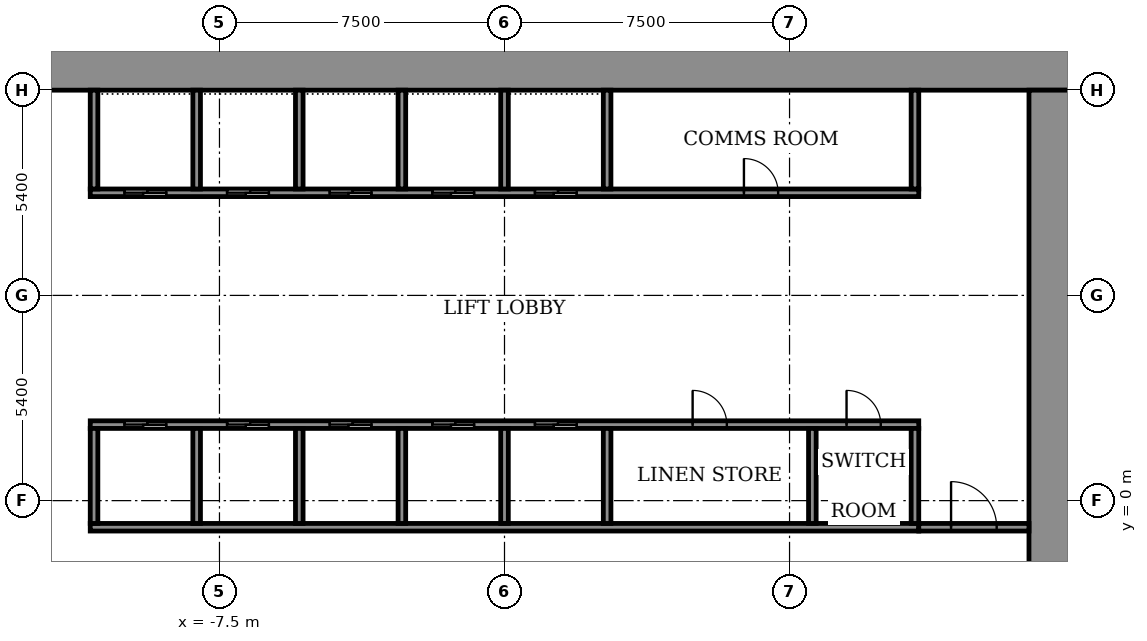
"""IFC4 building model, lengths in metres.
Left out: names, types, materials, properties, quantities, classifications, styles, units other than length and angle.
Written with IfcOpenShell. Run it as: python <this file> out.ifc"""

import sys

from ifc_helpers import new_model, si_unit, direction, frame, frame_2d, origin, place, context, subcontext, project, spatial, rectangle, extrude, element, fill, save


model = new_model("IFC4")
c1 = context("Model", 3, precision=1e-05, world=origin(), true_north=direction((0.0, 1.0)))
c2 = subcontext(c1, "Body", "Model", "MODEL_VIEW")
j1 = project(units=[si_unit("LENGTHUNIT", "METRE"), si_unit("PLANEANGLEUNIT", "RADIAN")], contexts=[c1])
p1 = place(None, origin())
s1 = spatial("IfcSite", under=j1, at=p1, CompositionType="ELEMENT")
p2 = place(p1, origin())
s2 = spatial("IfcBuilding", under=s1, at=p2, CompositionType="ELEMENT")
p3 = place(p2, frame((0.0, 0.0, 67.5)))
s3 = spatial("IfcBuildingStorey", under=s2, at=p3, CompositionType="ELEMENT", Elevation=67.5)
p4 = place(p3, frame((-14.9, 11.35, 0.0), z_axis=(0.0, 0.0, 1.0), x_axis=(1.0, 0.0, 0.0)))
e1 = element("IfcWall", 1, at=p4, inside=s3, PredefinedType="SHEAR", context=c2, shape_type="SweptSolid", body=[
    extrude(rectangle(XDim=29.8, YDim=1.1, at=frame_2d((14.9, 0.0))), origin(), (0.0, 0.0, 1.0), 3.6),
])
p5 = place(p3, frame((14.35, -10.8, 0.0), z_axis=(0.0, 0.0, 1.0), x_axis=(0.0, 1.0, 0.0)))
e2 = element("IfcWall", 2, at=p5, inside=s3, PredefinedType="SHEAR", context=c2, shape_type="SweptSolid", body=[
    extrude(rectangle(XDim=21.6, YDim=1.1, at=frame_2d((10.8, 0.0))), origin(), (0.0, 0.0, 1.0), 3.6),
])
p6 = place(p5, frame((1.2, 0.0, 0.0)))
e3 = element("IfcOpeningElement", 3, at=p6, cuts=e2, PredefinedType="OPENING", context=c2, shape_type="SweptSolid", body=[
    extrude(rectangle(XDim=1.2, YDim=2.1, at=frame_2d((0.6, 1.05))), frame((0.0, 0.56, 0.0), z_axis=(0.0, -1.0, 0.0), x_axis=(1.0, 0.0, 0.0)), (0.0, 0.0, 1.0), 1.12),
])
p7 = place(p3, frame((-10.9, -0.7, 0.0), z_axis=(0.0, 0.0, 1.0), x_axis=(1.0, 0.0, 0.0)))
e4 = element("IfcWall", 4, at=p7, inside=s3, PredefinedType="SHEAR", context=c2, shape_type="SweptSolid", body=[
    extrude(rectangle(XDim=21.8, YDim=0.2, at=frame_2d((10.9, 0.0))), origin(), (0.0, 0.0, 1.0), 3.05),
])
p8 = place(p3, frame((-10.9, 2.0, 0.0), z_axis=(0.0, 0.0, 1.0), x_axis=(1.0, 0.0, 0.0)))
e5 = element("IfcWall", 5, at=p8, inside=s3, PredefinedType="SHEAR", context=c2, shape_type="SweptSolid", body=[
    extrude(rectangle(XDim=21.8, YDim=0.2, at=frame_2d((10.9, 0.0))), origin(), (0.0, 0.0, 1.0), 3.05),
])
p9 = place(p8, frame((0.9, 0.0, 0.0)))
e6 = element("IfcOpeningElement", 6, at=p9, cuts=e5, PredefinedType="OPENING", context=c2, shape_type="SweptSolid", body=[
    extrude(rectangle(XDim=1.1, YDim=2.1, at=frame_2d((0.55, 1.05))), frame((0.0, 0.11, 0.0), z_axis=(0.0, -1.0, 0.0), x_axis=(1.0, 0.0, 0.0)), (0.0, 0.0, 1.0), 0.22),
])
p10 = place(p8, frame((3.6, 0.0, 0.0)))
e7 = element("IfcOpeningElement", 7, at=p10, cuts=e5, PredefinedType="OPENING", context=c2, shape_type="SweptSolid", body=[
    extrude(rectangle(XDim=1.1, YDim=2.1, at=frame_2d((0.55, 1.05))), frame((0.0, 0.11, 0.0), z_axis=(0.0, -1.0, 0.0), x_axis=(1.0, 0.0, 0.0)), (0.0, 0.0, 1.0), 0.22),
])
p11 = place(p8, frame((6.3, 0.0, 0.0)))
e8 = element("IfcOpeningElement", 8, at=p11, cuts=e5, PredefinedType="OPENING", context=c2, shape_type="SweptSolid", body=[
    extrude(rectangle(XDim=1.1, YDim=2.1, at=frame_2d((0.55, 1.05))), frame((0.0, 0.11, 0.0), z_axis=(0.0, -1.0, 0.0), x_axis=(1.0, 0.0, 0.0)), (0.0, 0.0, 1.0), 0.22),
])
p12 = place(p8, frame((9.0, 0.0, 0.0)))
e9 = element("IfcOpeningElement", 9, at=p12, cuts=e5, PredefinedType="OPENING", context=c2, shape_type="SweptSolid", body=[
    extrude(rectangle(XDim=1.1, YDim=2.1, at=frame_2d((0.55, 1.05))), frame((0.0, 0.11, 0.0), z_axis=(0.0, -1.0, 0.0), x_axis=(1.0, 0.0, 0.0)), (0.0, 0.0, 1.0), 0.22),
])
p13 = place(p8, frame((11.7, 0.0, 0.0)))
e10 = element("IfcOpeningElement", 10, at=p13, cuts=e5, PredefinedType="OPENING", context=c2, shape_type="SweptSolid", body=[
    extrude(rectangle(XDim=1.1, YDim=2.1, at=frame_2d((0.55, 1.05))), frame((0.0, 0.11, 0.0), z_axis=(0.0, -1.0, 0.0), x_axis=(1.0, 0.0, 0.0)), (0.0, 0.0, 1.0), 0.22),
])
p14 = place(p8, frame((15.85, 0.0, 0.0)))
e11 = element("IfcOpeningElement", 11, at=p14, cuts=e5, PredefinedType="OPENING", context=c2, shape_type="SweptSolid", body=[
    extrude(rectangle(XDim=0.9, YDim=2.1, at=frame_2d((0.45, 1.05))), frame((0.0, 0.11, 0.0), z_axis=(0.0, -1.0, 0.0), x_axis=(1.0, 0.0, 0.0)), (0.0, 0.0, 1.0), 0.22),
])
p15 = place(p8, frame((19.9, 0.0, 0.0)))
e12 = element("IfcOpeningElement", 12, at=p15, cuts=e5, PredefinedType="OPENING", context=c2, shape_type="SweptSolid", body=[
    extrude(rectangle(XDim=0.9, YDim=2.1, at=frame_2d((0.45, 1.05))), frame((0.0, 0.11, 0.0), z_axis=(0.0, -1.0, 0.0), x_axis=(1.0, 0.0, 0.0)), (0.0, 0.0, 1.0), 0.22),
])
p16 = place(p3, frame((-10.9, 8.1, 0.0), z_axis=(0.0, 0.0, 1.0), x_axis=(1.0, 0.0, 0.0)))
e13 = element("IfcWall", 13, at=p16, inside=s3, PredefinedType="SHEAR", context=c2, shape_type="SweptSolid", body=[
    extrude(rectangle(XDim=21.8, YDim=0.2, at=frame_2d((10.9, 0.0))), origin(), (0.0, 0.0, 1.0), 3.05),
])
p17 = place(p16, frame((0.9, 0.0, 0.0)))
e14 = element("IfcOpeningElement", 14, at=p17, cuts=e13, PredefinedType="OPENING", context=c2, shape_type="SweptSolid", body=[
    extrude(rectangle(XDim=1.1, YDim=2.1, at=frame_2d((0.55, 1.05))), frame((0.0, 0.11, 0.0), z_axis=(0.0, -1.0, 0.0), x_axis=(1.0, 0.0, 0.0)), (0.0, 0.0, 1.0), 0.22),
])
p18 = place(p16, frame((3.6, 0.0, 0.0)))
e15 = element("IfcOpeningElement", 15, at=p18, cuts=e13, PredefinedType="OPENING", context=c2, shape_type="SweptSolid", body=[
    extrude(rectangle(XDim=1.1, YDim=2.1, at=frame_2d((0.55, 1.05))), frame((0.0, 0.11, 0.0), z_axis=(0.0, -1.0, 0.0), x_axis=(1.0, 0.0, 0.0)), (0.0, 0.0, 1.0), 0.22),
])
p19 = place(p16, frame((6.3, 0.0, 0.0)))
e16 = element("IfcOpeningElement", 16, at=p19, cuts=e13, PredefinedType="OPENING", context=c2, shape_type="SweptSolid", body=[
    extrude(rectangle(XDim=1.1, YDim=2.1, at=frame_2d((0.55, 1.05))), frame((0.0, 0.11, 0.0), z_axis=(0.0, -1.0, 0.0), x_axis=(1.0, 0.0, 0.0)), (0.0, 0.0, 1.0), 0.22),
])
p20 = place(p16, frame((9.0, 0.0, 0.0)))
e17 = element("IfcOpeningElement", 17, at=p20, cuts=e13, PredefinedType="OPENING", context=c2, shape_type="SweptSolid", body=[
    extrude(rectangle(XDim=1.1, YDim=2.1, at=frame_2d((0.55, 1.05))), frame((0.0, 0.11, 0.0), z_axis=(0.0, -1.0, 0.0), x_axis=(1.0, 0.0, 0.0)), (0.0, 0.0, 1.0), 0.22),
])
p21 = place(p16, frame((11.7, 0.0, 0.0)))
e18 = element("IfcOpeningElement", 18, at=p21, cuts=e13, PredefinedType="OPENING", context=c2, shape_type="SweptSolid", body=[
    extrude(rectangle(XDim=1.1, YDim=2.1, at=frame_2d((0.55, 1.05))), frame((0.0, 0.11, 0.0), z_axis=(0.0, -1.0, 0.0), x_axis=(1.0, 0.0, 0.0)), (0.0, 0.0, 1.0), 0.22),
])
p22 = place(p16, frame((17.2, 0.0, 0.0)))
e19 = element("IfcOpeningElement", 19, at=p22, cuts=e13, PredefinedType="OPENING", context=c2, shape_type="SweptSolid", body=[
    extrude(rectangle(XDim=0.9, YDim=2.1, at=frame_2d((0.45, 1.05))), frame((0.0, 0.11, 0.0), z_axis=(0.0, -1.0, 0.0), x_axis=(1.0, 0.0, 0.0)), (0.0, 0.0, 1.0), 0.22),
])
for number, where, z_axis, x_axis in (
    (20, (-10.8, -0.6, 0.0), (0.0, 0.0, 1.0), (0.0, 1.0, 0.0)),
    (21, (-8.1, -0.6, 0.0), (0.0, 0.0, 1.0), (0.0, 1.0, 0.0)),
    (22, (-5.4, -0.6, 0.0), (0.0, 0.0, 1.0), (0.0, 1.0, 0.0)),
    (23, (-2.7, -0.6, 0.0), (0.0, 0.0, 1.0), (0.0, 1.0, 0.0)),
    (24, (0.0, -0.6, 0.0), (0.0, 0.0, 1.0), (0.0, 1.0, 0.0)),
    (25, (2.7, -0.6, 0.0), (0.0, 0.0, 1.0), (0.0, 1.0, 0.0)),
):
    element("IfcWall", number, at=place(p3, frame(where, z_axis=z_axis, x_axis=x_axis)), inside=s3, PredefinedType="SHEAR", context=c2, shape_type="SweptSolid", body=[
        extrude(rectangle(XDim=2.5, YDim=0.2, at=frame_2d((1.25, 0.0))), origin(), (0.0, 0.0, 1.0), 3.05),
    ])
for number, where, z_axis, x_axis in (
    (26, (8.1, -0.6, 0.0), (0.0, 0.0, 1.0), (0.0, 1.0, 0.0)),
    (27, (10.8, -0.6, 0.0), (0.0, 0.0, 1.0), (0.0, 1.0, 0.0)),
):
    element("IfcWall", number, at=place(p3, frame(where, z_axis=z_axis, x_axis=x_axis)), inside=s3, PredefinedType="STANDARD", context=c2, shape_type="SweptSolid", body=[
        extrude(rectangle(XDim=2.5, YDim=0.2, at=frame_2d((1.25, 0.0))), origin(), (0.0, 0.0, 1.0), 3.05),
    ])
for number, where, z_axis, x_axis in (
    (28, (-10.8, 8.2, 0.0), (0.0, 0.0, 1.0), (0.0, 1.0, 0.0)),
    (29, (-8.1, 8.2, 0.0), (0.0, 0.0, 1.0), (0.0, 1.0, 0.0)),
    (30, (-5.4, 8.2, 0.0), (0.0, 0.0, 1.0), (0.0, 1.0, 0.0)),
    (31, (-2.7, 8.2, 0.0), (0.0, 0.0, 1.0), (0.0, 1.0, 0.0)),
    (32, (0.0, 8.2, 0.0), (0.0, 0.0, 1.0), (0.0, 1.0, 0.0)),
    (33, (2.7, 8.2, 0.0), (0.0, 0.0, 1.0), (0.0, 1.0, 0.0)),
):
    element("IfcWall", number, at=place(p3, frame(where, z_axis=z_axis, x_axis=x_axis)), inside=s3, PredefinedType="SHEAR", context=c2, shape_type="SweptSolid", body=[
        extrude(rectangle(XDim=2.6, YDim=0.2, at=frame_2d((1.3, 0.0))), origin(), (0.0, 0.0, 1.0), 3.05),
    ])
p23 = place(p3, frame((10.8, 8.2, 0.0), z_axis=(0.0, 0.0, 1.0), x_axis=(0.0, 1.0, 0.0)))
e34 = element("IfcWall", 34, at=p23, inside=s3, PredefinedType="STANDARD", context=c2, shape_type="SweptSolid", body=[
    extrude(rectangle(XDim=2.6, YDim=0.2, at=frame_2d((1.3, 0.0))), origin(), (0.0, 0.0, 1.0), 3.05),
])
p24 = place(p3, frame((10.9, -0.7, 0.0), z_axis=(0.0, 0.0, 1.0), x_axis=(1.0, 0.0, 0.0)))
e35 = element("IfcWall", 35, at=p24, inside=s3, PredefinedType="STANDARD", context=c2, shape_type="SweptSolid", body=[
    extrude(rectangle(XDim=2.9, YDim=0.2, at=frame_2d((1.45, 0.0))), origin(), (0.0, 0.0, 1.0), 3.05),
])
p25 = place(p24, frame((0.85, 0.0, 0.0)))
e36 = element("IfcOpeningElement", 36, at=p25, cuts=e35, PredefinedType="OPENING", context=c2, shape_type="SweptSolid", body=[
    extrude(rectangle(XDim=1.2, YDim=2.1, at=frame_2d((0.6, 1.05))), frame((0.0, 0.11, 0.0), z_axis=(0.0, -1.0, 0.0), x_axis=(1.0, 0.0, 0.0)), (0.0, 0.0, 1.0), 0.22),
])
p26 = place(p9, origin())
e37 = element("IfcDoor", 37, at=p26, inside=s3, OperationType="SLIDING_TO_LEFT", PredefinedType="DOOR", context=c2, shape_type="SweptSolid", body=[
    extrude(rectangle(XDim=1.1, YDim=2.1, at=frame_2d((0.55, 1.05))), frame((0.0, 0.025, 0.0), z_axis=(0.0, -1.0, 0.0), x_axis=(1.0, 0.0, 0.0)), (0.0, 0.0, 1.0), 0.05),
])
fill(e6, e37)
p27 = place(p10, origin())
e38 = element("IfcDoor", 38, at=p27, inside=s3, OperationType="SLIDING_TO_LEFT", PredefinedType="DOOR", context=c2, shape_type="SweptSolid", body=[
    extrude(rectangle(XDim=1.1, YDim=2.1, at=frame_2d((0.55, 1.05))), frame((0.0, 0.025, 0.0), z_axis=(0.0, -1.0, 0.0), x_axis=(1.0, 0.0, 0.0)), (0.0, 0.0, 1.0), 0.05),
])
fill(e7, e38)
p28 = place(p11, origin())
e39 = element("IfcDoor", 39, at=p28, inside=s3, OperationType="SLIDING_TO_LEFT", PredefinedType="DOOR", context=c2, shape_type="SweptSolid", body=[
    extrude(rectangle(XDim=1.1, YDim=2.1, at=frame_2d((0.55, 1.05))), frame((0.0, 0.025, 0.0), z_axis=(0.0, -1.0, 0.0), x_axis=(1.0, 0.0, 0.0)), (0.0, 0.0, 1.0), 0.05),
])
fill(e8, e39)
p29 = place(p12, origin())
e40 = element("IfcDoor", 40, at=p29, inside=s3, OperationType="SLIDING_TO_LEFT", PredefinedType="DOOR", context=c2, shape_type="SweptSolid", body=[
    extrude(rectangle(XDim=1.1, YDim=2.1, at=frame_2d((0.55, 1.05))), frame((0.0, 0.025, 0.0), z_axis=(0.0, -1.0, 0.0), x_axis=(1.0, 0.0, 0.0)), (0.0, 0.0, 1.0), 0.05),
])
fill(e9, e40)
p30 = place(p13, origin())
e41 = element("IfcDoor", 41, at=p30, inside=s3, OperationType="SLIDING_TO_LEFT", PredefinedType="DOOR", context=c2, shape_type="SweptSolid", body=[
    extrude(rectangle(XDim=1.1, YDim=2.1, at=frame_2d((0.55, 1.05))), frame((0.0, 0.025, 0.0), z_axis=(0.0, -1.0, 0.0), x_axis=(1.0, 0.0, 0.0)), (0.0, 0.0, 1.0), 0.05),
])
fill(e10, e41)
p31 = place(p17, origin())
e42 = element("IfcDoor", 42, at=p31, inside=s3, OperationType="SLIDING_TO_LEFT", PredefinedType="DOOR", context=c2, shape_type="SweptSolid", body=[
    extrude(rectangle(XDim=1.1, YDim=2.1, at=frame_2d((0.55, 1.05))), frame((0.0, 0.025, 0.0), z_axis=(0.0, -1.0, 0.0), x_axis=(1.0, 0.0, 0.0)), (0.0, 0.0, 1.0), 0.05),
])
fill(e14, e42)
p32 = place(p18, origin())
e43 = element("IfcDoor", 43, at=p32, inside=s3, OperationType="SLIDING_TO_LEFT", PredefinedType="DOOR", context=c2, shape_type="SweptSolid", body=[
    extrude(rectangle(XDim=1.1, YDim=2.1, at=frame_2d((0.55, 1.05))), frame((0.0, 0.025, 0.0), z_axis=(0.0, -1.0, 0.0), x_axis=(1.0, 0.0, 0.0)), (0.0, 0.0, 1.0), 0.05),
])
fill(e15, e43)
p33 = place(p19, origin())
e44 = element("IfcDoor", 44, at=p33, inside=s3, OperationType="SLIDING_TO_LEFT", PredefinedType="DOOR", context=c2, shape_type="SweptSolid", body=[
    extrude(rectangle(XDim=1.1, YDim=2.1, at=frame_2d((0.55, 1.05))), frame((0.0, 0.025, 0.0), z_axis=(0.0, -1.0, 0.0), x_axis=(1.0, 0.0, 0.0)), (0.0, 0.0, 1.0), 0.05),
])
fill(e16, e44)
p34 = place(p20, origin())
e45 = element("IfcDoor", 45, at=p34, inside=s3, OperationType="SLIDING_TO_LEFT", PredefinedType="DOOR", context=c2, shape_type="SweptSolid", body=[
    extrude(rectangle(XDim=1.1, YDim=2.1, at=frame_2d((0.55, 1.05))), frame((0.0, 0.025, 0.0), z_axis=(0.0, -1.0, 0.0), x_axis=(1.0, 0.0, 0.0)), (0.0, 0.0, 1.0), 0.05),
])
fill(e17, e45)
p35 = place(p21, origin())
e46 = element("IfcDoor", 46, at=p35, inside=s3, OperationType="SLIDING_TO_LEFT", PredefinedType="DOOR", context=c2, shape_type="SweptSolid", body=[
    extrude(rectangle(XDim=1.1, YDim=2.1, at=frame_2d((0.55, 1.05))), frame((0.0, 0.025, 0.0), z_axis=(0.0, -1.0, 0.0), x_axis=(1.0, 0.0, 0.0)), (0.0, 0.0, 1.0), 0.05),
])
fill(e18, e46)
p36 = place(p14, origin())
e47 = element("IfcDoor", 47, at=p36, inside=s3, OperationType="SINGLE_SWING_RIGHT", PredefinedType="DOOR", context=c2, shape_type="SweptSolid", body=[
    extrude(rectangle(XDim=0.9, YDim=2.1, at=frame_2d((0.45, 1.05))), frame((0.0, 0.025, 0.0), z_axis=(0.0, -1.0, 0.0), x_axis=(1.0, 0.0, 0.0)), (0.0, 0.0, 1.0), 0.05),
])
fill(e11, e47)
p37 = place(p15, origin())
e48 = element("IfcDoor", 48, at=p37, inside=s3, OperationType="SINGLE_SWING_LEFT", PredefinedType="DOOR", context=c2, shape_type="SweptSolid", body=[
    extrude(rectangle(XDim=0.9, YDim=2.1, at=frame_2d((0.45, 1.05))), frame((0.0, 0.025, 0.0), z_axis=(0.0, -1.0, 0.0), x_axis=(1.0, 0.0, 0.0)), (0.0, 0.0, 1.0), 0.05),
])
fill(e12, e48)
p38 = place(p22, origin())
e49 = element("IfcDoor", 49, at=p38, inside=s3, OperationType="SINGLE_SWING_LEFT", PredefinedType="DOOR", context=c2, shape_type="SweptSolid", body=[
    extrude(rectangle(XDim=0.9, YDim=2.1, at=frame_2d((0.45, 1.05))), frame((0.0, 0.025, 0.0), z_axis=(0.0, -1.0, 0.0), x_axis=(1.0, 0.0, 0.0)), (0.0, 0.0, 1.0), 0.05),
])
fill(e19, e49)
p39 = place(p25, origin())
e50 = element("IfcDoor", 50, at=p39, inside=s3, OperationType="SINGLE_SWING_LEFT", PredefinedType="DOOR", context=c2, shape_type="SweptSolid", body=[
    extrude(rectangle(XDim=1.2, YDim=2.1, at=frame_2d((0.6, 1.05))), frame((0.0, 0.025, 0.0), z_axis=(0.0, -1.0, 0.0), x_axis=(1.0, 0.0, 0.0)), (0.0, 0.0, 1.0), 0.05),
])
fill(e36, e50)
save(model, sys.argv[1])
